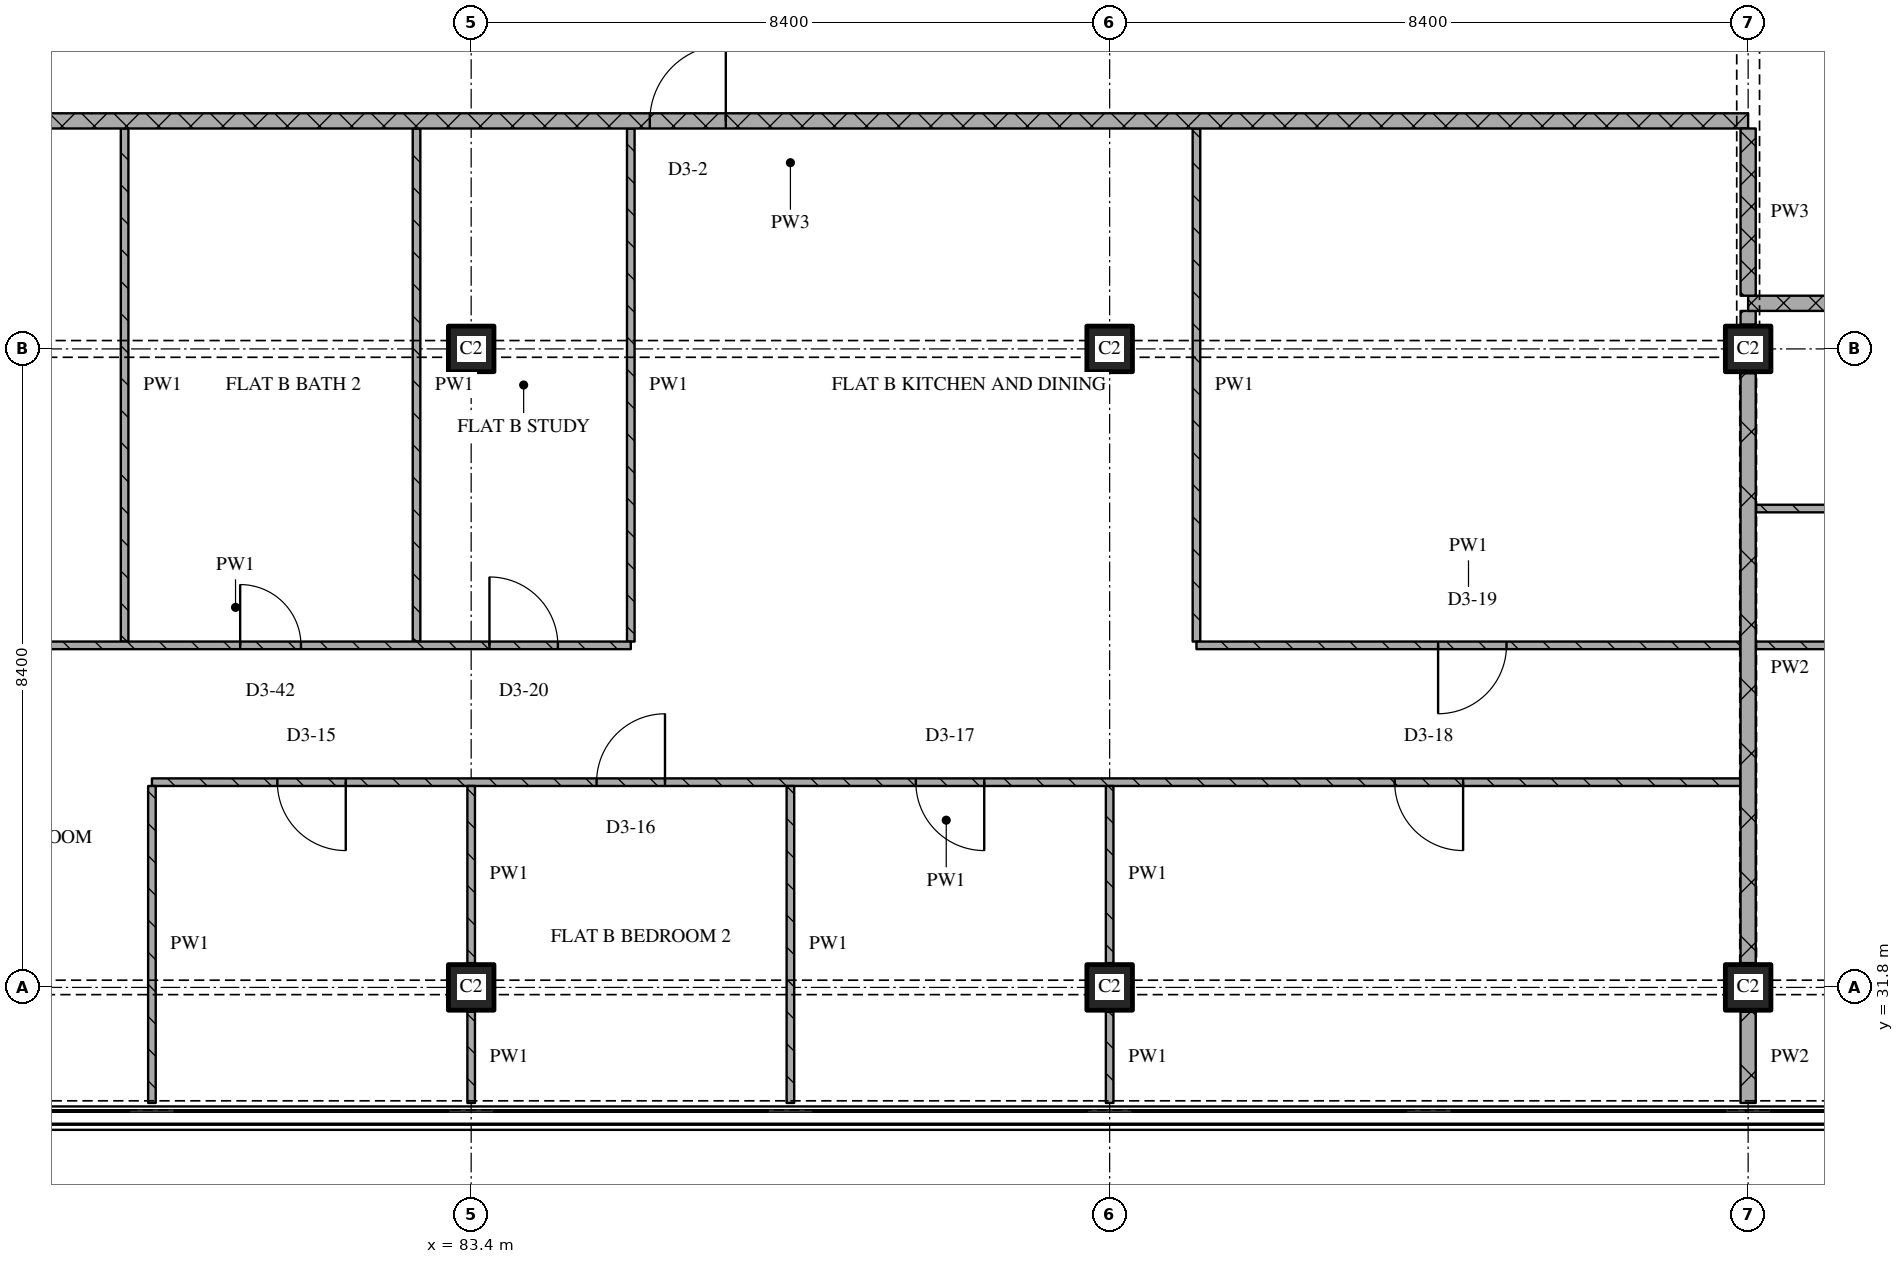
"""IFC4 building model, lengths in metres.
Left out: names, types, materials, properties, quantities, classifications, styles, units other than length and angle.
Written with IfcOpenShell. Run it as: python <this file> out.ifc"""

import sys

from ifc_helpers import new_model, si_unit, direction, frame, frame_2d, origin, origin_2d, place, context, subcontext, project, spatial, rectangle, extrude, element, fill, save


model = new_model("IFC4")
c1 = context("Model", 3, precision=1e-05, world=origin(), true_north=direction((0.0, 1.0)))
c2 = subcontext(c1, "Body", "Model", "MODEL_VIEW")
j1 = project(units=[si_unit("LENGTHUNIT", "METRE"), si_unit("PLANEANGLEUNIT", "RADIAN")], contexts=[c1])
p1 = place(None, origin())
s1 = spatial("IfcSite", under=j1, at=p1, CompositionType="ELEMENT")
p2 = place(p1, origin())
s2 = spatial("IfcBuilding", under=s1, at=p2, CompositionType="ELEMENT")
p3 = place(p2, frame((0.0, 0.0, 230.7)))
s3 = spatial("IfcBuildingStorey", under=s2, at=p3, CompositionType="ELEMENT", Elevation=230.7)
for number, where, z_axis, x_axis in (
    (1, (83.4, 31.8, 0.0), (0.0, 0.0, 1.0), (1.0, 0.0, 0.0)),
    (2, (83.4, 40.2, 0.0), (0.0, 0.0, 1.0), (1.0, 0.0, 0.0)),
    (3, (91.8, 31.8, 0.0), (0.0, 0.0, 1.0), (1.0, 0.0, 0.0)),
    (4, (91.8, 40.2, 0.0), (0.0, 0.0, 1.0), (1.0, 0.0, 0.0)),
    (5, (100.2, 31.8, 0.0), (0.0, 0.0, 1.0), (1.0, 0.0, 0.0)),
    (6, (100.2, 40.2, 0.0), (0.0, 0.0, 1.0), (1.0, 0.0, 0.0)),
):
    element("IfcColumn", number, at=place(p3, frame(where, z_axis=z_axis, x_axis=x_axis)), inside=s3, PredefinedType="COLUMN", context=c2, shape_type="SweptSolid", body=[
        extrude(rectangle(XDim=0.6, YDim=0.6, at=origin_2d()), origin(), (0.0, 0.0, 1.0), 3.6),
    ])
p4 = place(p3, frame((100.1, 34.5, 0.0), z_axis=(0.0, 0.0, 1.0), x_axis=(-1.0, 0.0, 0.0)))
e7 = element("IfcWall", 7, at=p4, inside=s3, PredefinedType="PARTITIONING", context=c2, shape_type="SweptSolid", body=[
    extrude(rectangle(XDim=20.9, YDim=0.1, at=frame_2d((10.45, 0.0))), origin(), (0.0, 0.0, 1.0), 3.32),
])
p5 = place(p4, frame((3.65, 0.0, 0.0)))
e8 = element("IfcOpeningElement", 8, at=p5, cuts=e7, PredefinedType="OPENING", context=c2, shape_type="SweptSolid", body=[
    extrude(rectangle(XDim=0.9, YDim=2.1, at=frame_2d((0.45, 1.05))), frame((0.0, 0.06, 0.0), z_axis=(0.0, -1.0, 0.0), x_axis=(1.0, 0.0, 0.0)), (0.0, 0.0, 1.0), 0.12),
])
p6 = place(p4, frame((9.95, 0.0, 0.0)))
e9 = element("IfcOpeningElement", 9, at=p6, cuts=e7, PredefinedType="OPENING", context=c2, shape_type="SweptSolid", body=[
    extrude(rectangle(XDim=0.9, YDim=2.1, at=frame_2d((0.45, 1.05))), frame((0.0, 0.06, 0.0), z_axis=(0.0, -1.0, 0.0), x_axis=(1.0, 0.0, 0.0)), (0.0, 0.0, 1.0), 0.12),
])
p7 = place(p4, frame((14.15, 0.0, 0.0)))
e10 = element("IfcOpeningElement", 10, at=p7, cuts=e7, PredefinedType="OPENING", context=c2, shape_type="SweptSolid", body=[
    extrude(rectangle(XDim=0.9, YDim=2.1, at=frame_2d((0.45, 1.05))), frame((0.0, 0.06, 0.0), z_axis=(0.0, -1.0, 0.0), x_axis=(1.0, 0.0, 0.0)), (0.0, 0.0, 1.0), 0.12),
])
p8 = place(p4, frame((18.35, 0.0, 0.0)))
e11 = element("IfcOpeningElement", 11, at=p8, cuts=e7, PredefinedType="OPENING", context=c2, shape_type="SweptSolid", body=[
    extrude(rectangle(XDim=0.9, YDim=2.1, at=frame_2d((0.45, 1.05))), frame((0.0, 0.06, 0.0), z_axis=(0.0, -1.0, 0.0), x_axis=(1.0, 0.0, 0.0)), (0.0, 0.0, 1.0), 0.12),
])
p9 = place(p3, frame((100.3, 38.1, 0.0), z_axis=(0.0, 0.0, 1.0), x_axis=(1.0, 0.0, 0.0)))
e12 = element("IfcWall", 12, at=p9, inside=s3, PredefinedType="PARTITIONING", context=c2, shape_type="SweptSolid", body=[
    extrude(rectangle(XDim=9.5, YDim=0.1, at=frame_2d((4.75, 0.0))), origin(), (0.0, 0.0, 1.0), 3.32),
])
p10 = place(p9, frame((1.75, 0.0, 0.0)))
e13 = element("IfcOpeningElement", 13, at=p10, cuts=e12, PredefinedType="OPENING", context=c2, shape_type="SweptSolid", body=[
    extrude(rectangle(XDim=0.8, YDim=2.1, at=frame_2d((0.4, 1.05))), frame((0.0, 0.06, 0.0), z_axis=(0.0, -1.0, 0.0), x_axis=(1.0, 0.0, 0.0)), (0.0, 0.0, 1.0), 0.12),
])
p11 = place(p3, frame((124.58, 40.8, 0.0), z_axis=(0.0, 0.0, 1.0), x_axis=(-1.0, 0.0, 0.0)))
e14 = element("IfcWall", 14, at=p11, inside=s3, PredefinedType="PARTITIONING", context=c2, shape_type="SweptSolid", body=[
    extrude(rectangle(XDim=24.38, YDim=0.2, at=frame_2d((12.19, 0.0))), origin(), (0.0, 0.0, 1.0), 3.32),
])
p12 = place(p11, frame((13.53, 0.0, 0.0)))
e15 = element("IfcOpeningElement", 15, at=p12, cuts=e14, PredefinedType="OPENING", context=c2, shape_type="SweptSolid", body=[
    extrude(rectangle(XDim=1.0, YDim=2.1, at=frame_2d((0.5, 1.05))), frame((0.0, 0.11, 0.0), z_axis=(0.0, -1.0, 0.0), x_axis=(1.0, 0.0, 0.0)), (0.0, 0.0, 1.0), 0.22),
])
p13 = place(p3, frame((100.2, 43.2, 0.0), z_axis=(0.0, 0.0, 1.0), x_axis=(-1.0, 0.0, 0.0)))
e16 = element("IfcWall", 16, at=p13, inside=s3, PredefinedType="PARTITIONING", context=c2, shape_type="SweptSolid", body=[
    extrude(rectangle(XDim=25.2, YDim=0.2, at=frame_2d((12.6, 0.0))), origin(), (0.0, 0.0, 1.0), 3.32),
])
p14 = place(p13, frame((13.45, 0.0, 0.0)))
e17 = element("IfcOpeningElement", 17, at=p14, cuts=e16, PredefinedType="OPENING", context=c2, shape_type="SweptSolid", body=[
    extrude(rectangle(XDim=1.0, YDim=2.1, at=frame_2d((0.5, 1.05))), frame((0.0, 0.11, 0.0), z_axis=(0.0, -1.0, 0.0), x_axis=(1.0, 0.0, 0.0)), (0.0, 0.0, 1.0), 0.22),
])
p15 = place(p3, frame((78.841, 43.1, 0.0), z_axis=(0.0, 0.0, 1.0), x_axis=(0.0, -1.0, 0.0)))
e18 = element("IfcWall", 18, at=p15, inside=s3, PredefinedType="PARTITIONING", context=c2, shape_type="SweptSolid", body=[
    extrude(rectangle(XDim=6.75, YDim=0.1, at=frame_2d((3.375, 0.0))), origin(), (0.0, 0.0, 1.0), 3.32),
])
p16 = place(p3, frame((79.2, 34.45, 0.0), z_axis=(0.0, 0.0, 1.0), x_axis=(0.0, -1.0, 0.0)))
e19 = element("IfcWall", 19, at=p16, inside=s3, PredefinedType="PARTITIONING", context=c2, shape_type="SweptSolid", body=[
    extrude(rectangle(XDim=4.17, YDim=0.1, at=frame_2d((2.085, 0.0))), origin(), (0.0, 0.0, 1.0), 3.32),
])
p17 = place(p3, frame((82.681, 43.1, 0.0), z_axis=(0.0, 0.0, 1.0), x_axis=(0.0, -1.0, 0.0)))
e20 = element("IfcWall", 20, at=p17, inside=s3, PredefinedType="PARTITIONING", context=c2, shape_type="SweptSolid", body=[
    extrude(rectangle(XDim=6.75, YDim=0.1, at=frame_2d((3.375, 0.0))), origin(), (0.0, 0.0, 1.0), 3.32),
])
p18 = place(p3, frame((83.4, 31.48, 0.0), z_axis=(0.0, 0.0, 1.0), x_axis=(0.0, -1.0, 0.0)))
e21 = element("IfcWall", 21, at=p18, inside=s3, PredefinedType="PARTITIONING", context=c2, shape_type="SweptSolid", body=[
    extrude(rectangle(XDim=1.2, YDim=0.1, at=frame_2d((0.6, 0.0))), origin(), (0.0, 0.0, 1.0), 3.32),
])
p19 = place(p3, frame((83.4, 34.45, 0.0), z_axis=(0.0, 0.0, 1.0), x_axis=(0.0, -1.0, 0.0)))
e22 = element("IfcWall", 22, at=p19, inside=s3, PredefinedType="PARTITIONING", context=c2, shape_type="SweptSolid", body=[
    extrude(rectangle(XDim=2.33, YDim=0.1, at=frame_2d((1.165, 0.0))), origin(), (0.0, 0.0, 1.0), 3.32),
])
p20 = place(p3, frame((85.5, 43.1, 0.0), z_axis=(0.0, 0.0, 1.0), x_axis=(0.0, -1.0, 0.0)))
e23 = element("IfcWall", 23, at=p20, inside=s3, PredefinedType="PARTITIONING", context=c2, shape_type="SweptSolid", body=[
    extrude(rectangle(XDim=6.75, YDim=0.1, at=frame_2d((3.375, 0.0))), origin(), (0.0, 0.0, 1.0), 3.32),
])
p21 = place(p3, frame((87.6, 34.45, 0.0), z_axis=(0.0, 0.0, 1.0), x_axis=(0.0, -1.0, 0.0)))
e24 = element("IfcWall", 24, at=p21, inside=s3, PredefinedType="PARTITIONING", context=c2, shape_type="SweptSolid", body=[
    extrude(rectangle(XDim=4.17, YDim=0.1, at=frame_2d((2.085, 0.0))), origin(), (0.0, 0.0, 1.0), 3.32),
])
p22 = place(p3, frame((91.8, 31.48, 0.0), z_axis=(0.0, 0.0, 1.0), x_axis=(0.0, -1.0, 0.0)))
e25 = element("IfcWall", 25, at=p22, inside=s3, PredefinedType="PARTITIONING", context=c2, shape_type="SweptSolid", body=[
    extrude(rectangle(XDim=1.2, YDim=0.1, at=frame_2d((0.6, 0.0))), origin(), (0.0, 0.0, 1.0), 3.32),
])
p23 = place(p3, frame((91.8, 34.45, 0.0), z_axis=(0.0, 0.0, 1.0), x_axis=(0.0, -1.0, 0.0)))
e26 = element("IfcWall", 26, at=p23, inside=s3, PredefinedType="PARTITIONING", context=c2, shape_type="SweptSolid", body=[
    extrude(rectangle(XDim=2.33, YDim=0.1, at=frame_2d((1.165, 0.0))), origin(), (0.0, 0.0, 1.0), 3.32),
])
p24 = place(p3, frame((92.942, 43.1, 0.0), z_axis=(0.0, 0.0, 1.0), x_axis=(0.0, -1.0, 0.0)))
e27 = element("IfcWall", 27, at=p24, inside=s3, PredefinedType="PARTITIONING", context=c2, shape_type="SweptSolid", body=[
    extrude(rectangle(XDim=6.75, YDim=0.1, at=frame_2d((3.375, 0.0))), origin(), (0.0, 0.0, 1.0), 3.32),
])
p25 = place(p3, frame((100.2, 43.1, 0.0), z_axis=(0.0, 0.0, 1.0), x_axis=(0.0, -1.0, 0.0)))
e28 = element("IfcWall", 28, at=p25, inside=s3, PredefinedType="PARTITIONING", context=c2, shape_type="SweptSolid", body=[
    extrude(rectangle(XDim=2.2, YDim=0.2, at=frame_2d((1.1, 0.0))), origin(), (0.0, 0.0, 1.0), 2.53),
])
p26 = place(p3, frame((100.2, 31.48, 0.0), z_axis=(0.0, 0.0, 1.0), x_axis=(0.0, -1.0, 0.0)))
e29 = element("IfcWall", 29, at=p26, inside=s3, PredefinedType="PARTITIONING", context=c2, shape_type="SweptSolid", body=[
    extrude(rectangle(XDim=1.2, YDim=0.2, at=frame_2d((0.6, 0.0))), origin(), (0.0, 0.0, 1.0), 3.32),
])
p27 = place(p3, frame((100.2, 39.88, 0.0), z_axis=(0.0, 0.0, 1.0), x_axis=(0.0, -1.0, 0.0)))
e30 = element("IfcWall", 30, at=p27, inside=s3, PredefinedType="PARTITIONING", context=c2, shape_type="SweptSolid", body=[
    extrude(rectangle(XDim=7.76, YDim=0.2, at=frame_2d((3.88, 0.0))), origin(), (0.0, 0.0, 1.0), 2.72),
])
p28 = place(p3, frame((100.2, 40.7, 0.0), z_axis=(0.0, 0.0, 1.0), x_axis=(0.0, -1.0, 0.0)))
e31 = element("IfcWall", 31, at=p28, inside=s3, PredefinedType="PARTITIONING", context=c2, shape_type="SweptSolid", body=[
    extrude(rectangle(XDim=0.18, YDim=0.2, at=frame_2d((0.09, 0.0))), origin(), (0.0, 0.0, 1.0), 3.32),
])
p29 = place(p3, frame((75.1, 36.3, 0.0), z_axis=(0.0, 0.0, 1.0), x_axis=(1.0, 0.0, 0.0)))
e32 = element("IfcWall", 32, at=p29, inside=s3, PredefinedType="PARTITIONING", context=c2, shape_type="SweptSolid", body=[
    extrude(rectangle(XDim=10.4, YDim=0.1, at=frame_2d((5.2, 0.0))), origin(), (0.0, 0.0, 1.0), 3.32),
])
p30 = place(p29, frame((1.42, 0.0, 0.0)))
e33 = element("IfcOpeningElement", 33, at=p30, cuts=e32, PredefinedType="OPENING", context=c2, shape_type="SweptSolid", body=[
    extrude(rectangle(XDim=0.8, YDim=2.1, at=frame_2d((0.4, 1.05))), frame((0.0, 0.06, 0.0), z_axis=(0.0, -1.0, 0.0), x_axis=(1.0, 0.0, 0.0)), (0.0, 0.0, 1.0), 0.12),
])
p31 = place(p29, frame((5.261, 0.0, 0.0)))
e34 = element("IfcOpeningElement", 34, at=p31, cuts=e32, PredefinedType="OPENING", context=c2, shape_type="SweptSolid", body=[
    extrude(rectangle(XDim=0.8, YDim=2.1, at=frame_2d((0.4, 1.05))), frame((0.0, 0.06, 0.0), z_axis=(0.0, -1.0, 0.0), x_axis=(1.0, 0.0, 0.0)), (0.0, 0.0, 1.0), 0.12),
])
p32 = place(p29, frame((8.541, 0.0, 0.0)))
e35 = element("IfcOpeningElement", 35, at=p32, cuts=e32, PredefinedType="OPENING", context=c2, shape_type="SweptSolid", body=[
    extrude(rectangle(XDim=0.9, YDim=2.1, at=frame_2d((0.45, 1.05))), frame((0.0, 0.06, 0.0), z_axis=(0.0, -1.0, 0.0), x_axis=(1.0, 0.0, 0.0)), (0.0, 0.0, 1.0), 0.12),
])
p33 = place(p3, frame((92.942, 36.3, 0.0), z_axis=(0.0, 0.0, 1.0), x_axis=(1.0, 0.0, 0.0)))
e36 = element("IfcWall", 36, at=p33, inside=s3, PredefinedType="PARTITIONING", context=c2, shape_type="SweptSolid", body=[
    extrude(rectangle(XDim=7.158, YDim=0.1, at=frame_2d((3.579, 0.0))), origin(), (0.0, 0.0, 1.0), 3.32),
])
p34 = place(p33, frame((3.179, 0.0, 0.0)))
e37 = element("IfcOpeningElement", 37, at=p34, cuts=e36, PredefinedType="OPENING", context=c2, shape_type="SweptSolid", body=[
    extrude(rectangle(XDim=0.9, YDim=2.1, at=frame_2d((0.45, 1.05))), frame((0.0, 0.06, 0.0), z_axis=(0.0, -1.0, 0.0), x_axis=(1.0, 0.0, 0.0)), (0.0, 0.0, 1.0), 0.12),
])
p35 = place(p3, frame((100.3, 36.3, 0.0), z_axis=(0.0, 0.0, 1.0), x_axis=(1.0, 0.0, 0.0)))
e38 = element("IfcWall", 38, at=p35, inside=s3, PredefinedType="PARTITIONING", context=c2, shape_type="SweptSolid", body=[
    extrude(rectangle(XDim=8.3, YDim=0.1, at=frame_2d((4.15, 0.0))), origin(), (0.0, 0.0, 1.0), 3.32),
])
p36 = place(p5, origin())
e39 = element("IfcDoor", 39, at=p36, inside=s3, OperationType="SINGLE_SWING_LEFT", PredefinedType="DOOR", context=c2, shape_type="SweptSolid", body=[
    extrude(rectangle(XDim=0.9, YDim=2.1, at=frame_2d((0.45, 1.05))), frame((0.0, 0.025, 0.0), z_axis=(0.0, -1.0, 0.0), x_axis=(1.0, 0.0, 0.0)), (0.0, 0.0, 1.0), 0.05),
])
fill(e8, e39)
p37 = place(p6, origin())
e40 = element("IfcDoor", 40, at=p37, inside=s3, OperationType="SINGLE_SWING_LEFT", PredefinedType="DOOR", context=c2, shape_type="SweptSolid", body=[
    extrude(rectangle(XDim=0.9, YDim=2.1, at=frame_2d((0.45, 1.05))), frame((0.0, 0.025, 0.0), z_axis=(0.0, -1.0, 0.0), x_axis=(1.0, 0.0, 0.0)), (0.0, 0.0, 1.0), 0.05),
])
fill(e9, e40)
p38 = place(p7, origin())
e41 = element("IfcDoor", 41, at=p38, inside=s3, OperationType="SINGLE_SWING_RIGHT", PredefinedType="DOOR", context=c2, shape_type="SweptSolid", body=[
    extrude(rectangle(XDim=0.9, YDim=2.1, at=frame_2d((0.45, 1.05))), frame((0.0, 0.025, 0.0), z_axis=(0.0, -1.0, 0.0), x_axis=(1.0, 0.0, 0.0)), (0.0, 0.0, 1.0), 0.05),
])
fill(e10, e41)
p39 = place(p8, origin())
e42 = element("IfcDoor", 42, at=p39, inside=s3, OperationType="SINGLE_SWING_LEFT", PredefinedType="DOOR", context=c2, shape_type="SweptSolid", body=[
    extrude(rectangle(XDim=0.9, YDim=2.1, at=frame_2d((0.45, 1.05))), frame((0.0, 0.025, 0.0), z_axis=(0.0, -1.0, 0.0), x_axis=(1.0, 0.0, 0.0)), (0.0, 0.0, 1.0), 0.05),
])
fill(e11, e42)
p40 = place(p14, origin())
e43 = element("IfcDoor", 43, at=p40, inside=s3, OperationType="SINGLE_SWING_RIGHT", PredefinedType="DOOR", context=c2, shape_type="SweptSolid", body=[
    extrude(rectangle(XDim=1.0, YDim=2.1, at=frame_2d((0.5, 1.05))), frame((0.0, 0.025, 0.0), z_axis=(0.0, -1.0, 0.0), x_axis=(1.0, 0.0, 0.0)), (0.0, 0.0, 1.0), 0.05),
])
fill(e17, e43)
p41 = place(p31, origin())
e44 = element("IfcDoor", 44, at=p41, inside=s3, OperationType="SINGLE_SWING_LEFT", PredefinedType="DOOR", context=c2, shape_type="SweptSolid", body=[
    extrude(rectangle(XDim=0.8, YDim=2.1, at=frame_2d((0.4, 1.05))), frame((0.0, 0.025, 0.0), z_axis=(0.0, -1.0, 0.0), x_axis=(1.0, 0.0, 0.0)), (0.0, 0.0, 1.0), 0.05),
])
fill(e34, e44)
p42 = place(p32, origin())
e45 = element("IfcDoor", 45, at=p42, inside=s3, OperationType="SINGLE_SWING_LEFT", PredefinedType="DOOR", context=c2, shape_type="SweptSolid", body=[
    extrude(rectangle(XDim=0.9, YDim=2.1, at=frame_2d((0.45, 1.05))), frame((0.0, 0.025, 0.0), z_axis=(0.0, -1.0, 0.0), x_axis=(1.0, 0.0, 0.0)), (0.0, 0.0, 1.0), 0.05),
])
fill(e35, e45)
p43 = place(p34, origin())
e46 = element("IfcDoor", 46, at=p43, inside=s3, OperationType="SINGLE_SWING_RIGHT", PredefinedType="DOOR", context=c2, shape_type="SweptSolid", body=[
    extrude(rectangle(XDim=0.9, YDim=2.1, at=frame_2d((0.45, 1.05))), frame((0.0, 0.025, 0.0), z_axis=(0.0, -1.0, 0.0), x_axis=(1.0, 0.0, 0.0)), (0.0, 0.0, 1.0), 0.05),
])
fill(e37, e46)
save(model, sys.argv[1])
